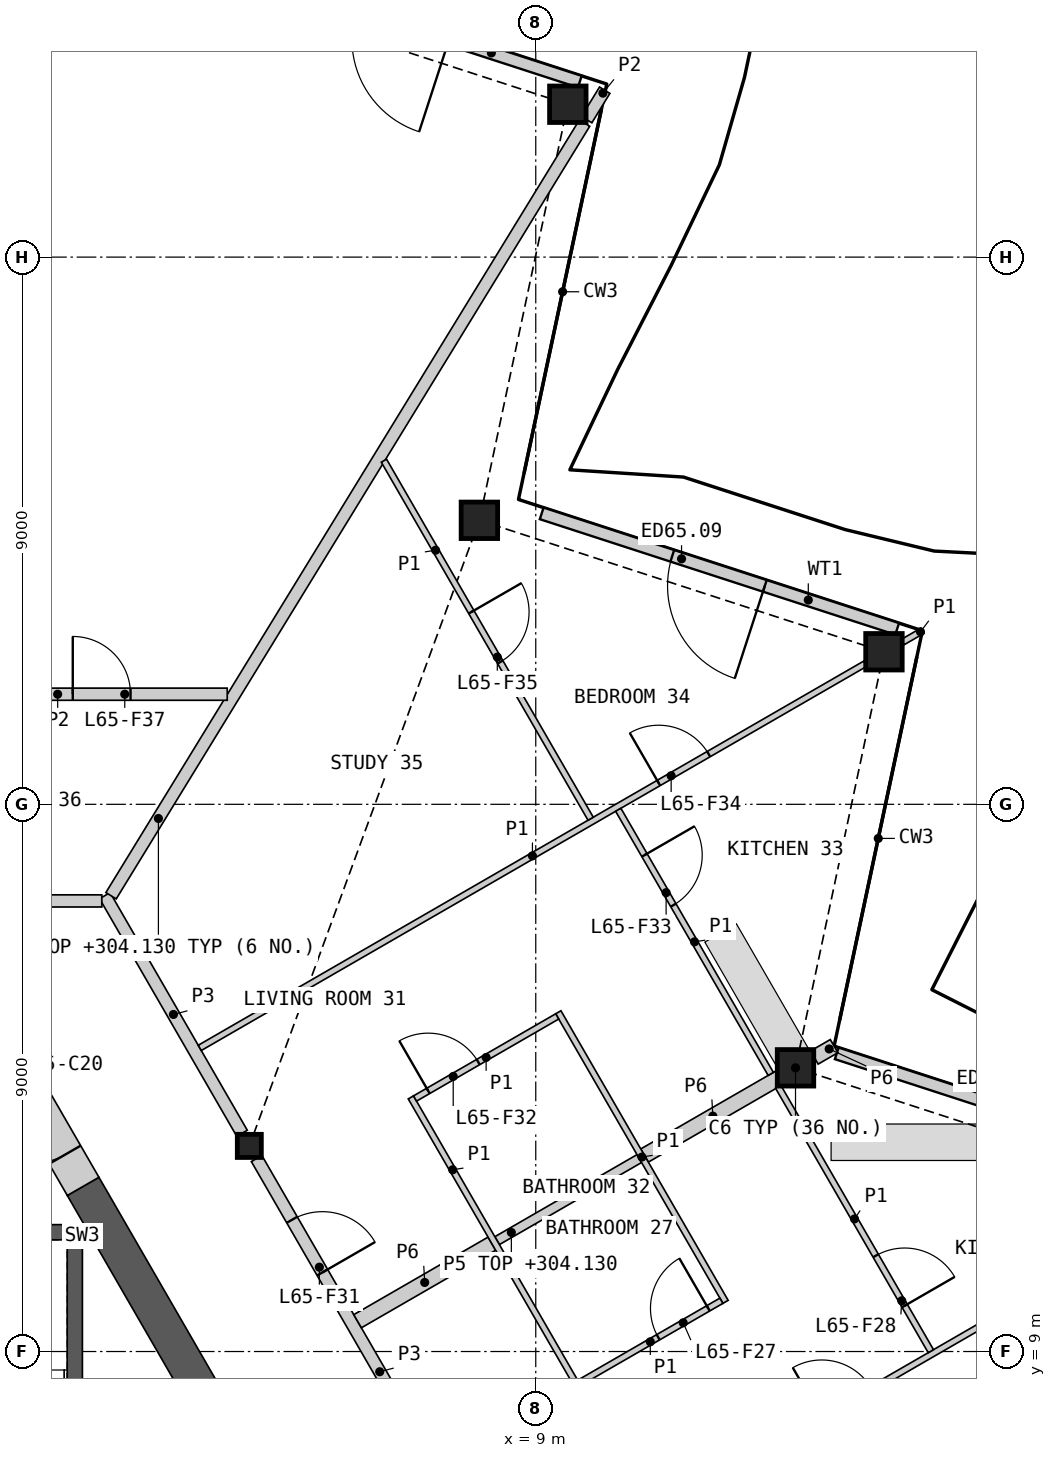
"""IFC4 building model, lengths in metres.
Left out: names, types, materials, properties, quantities, classifications, styles, units other than length and angle.
Written with IfcOpenShell. Run it as: python <this file> out.ifc"""

import sys

from ifc_helpers import new_model, si_unit, direction, frame, frame_2d, origin, origin_2d, place, context, subcontext, project, spatial, polyline, rectangle, hollow_rectangle, i_section, outline, extrude, element, fill, save


model = new_model("IFC4")
c1 = context("Model", 3, precision=1e-05, world=origin(), true_north=direction((0.0, 1.0)))
c2 = subcontext(c1, "Body", "Model", "MODEL_VIEW")
j1 = project(units=[si_unit("LENGTHUNIT", "METRE"), si_unit("PLANEANGLEUNIT", "RADIAN")], contexts=[c1])
p1 = place(None, origin())
s1 = spatial("IfcSite", under=j1, at=p1, CompositionType="ELEMENT")
p2 = place(p1, origin())
s2 = spatial("IfcBuilding", under=s1, at=p2, CompositionType="ELEMENT")
p3 = place(p2, frame((0.0, 0.0, 301.8)))
s3 = spatial("IfcBuildingStorey", under=s2, at=p3, CompositionType="ELEMENT", Elevation=301.8)
for number, where, z_axis, x_axis in (
    (1, (13.272, 13.666, 0.0), (0.0, 0.0, 1.0), (1.0, 0.0, 0.0)),
    (2, (14.727, 20.509, 0.0), (0.0, 0.0, 1.0), (1.0, 0.0, 0.0)),
    (3, (8.073, 22.671, 0.0), (0.0, 0.0, 1.0), (1.0, 0.0, 0.0)),
    (4, (9.527, 29.514, 0.0), (0.0, 0.0, 1.0), (1.0, 0.0, 0.0)),
):
    element("IfcColumn", number, at=place(p3, frame(where, z_axis=z_axis, x_axis=x_axis)), inside=s3, PredefinedType="COLUMN", context=c2, shape_type="SweptSolid", body=[
        extrude(hollow_rectangle(XDim=0.6, YDim=0.6, WallThickness=0.04, at=origin_2d()), origin(), (0.0, 0.0, 1.0), 3.4),
    ])
p4 = place(p3, frame((4.289, 12.382, 0.0), z_axis=(0.0, 0.0, 1.0), x_axis=(1.0, 0.0, 0.0)))
e5 = element("IfcColumn", 5, at=p4, inside=s3, PredefinedType="COLUMN", context=c2, shape_type="SweptSolid", body=[
    extrude(i_section(OverallWidth=0.396, OverallDepth=0.381, WebThickness=0.019, FlangeThickness=0.03, at=origin_2d()), origin(), (0.0, 0.0, 1.0), 3.4),
])
p5 = place(p3, frame((20.178, 11.88, 0.0), z_axis=(0.0, 0.0, 1.0), x_axis=(-0.951053245104, 0.309027061884, 0.0)))
e6 = element("IfcWall", 6, at=p5, inside=s3, PredefinedType="SOLIDWALL", context=c2, shape_type="SweptSolid", body=[
    extrude(rectangle(XDim=6.549, YDim=0.2, at=frame_2d((3.274, 0.0))), origin(), (0.0, 0.0, 1.0), 2.488),
])
p6 = place(p5, frame((2.334, 0.0, 0.0)))
e7 = element("IfcOpeningElement", 7, at=p6, cuts=e6, PredefinedType="OPENING", context=c2, shape_type="SweptSolid", body=[
    extrude(rectangle(XDim=1.6, YDim=2.25, at=frame_2d((0.8, 1.125))), frame((0.0, 0.11, 0.0), z_axis=(0.0, -1.0, 0.0), x_axis=(1.0, 0.0, 0.0)), (0.0, 0.0, 1.0), 0.22),
])
p7 = place(p3, frame((14.944, 20.885, 0.0), z_axis=(0.0, 0.0, 1.0), x_axis=(-0.951062668065, 0.308998060534, 0.0)))
e8 = element("IfcWall", 8, at=p7, inside=s3, PredefinedType="SOLIDWALL", context=c2, shape_type="SweptSolid", body=[
    extrude(rectangle(XDim=6.147, YDim=0.2, at=frame_2d((3.073, 0.0))), origin(), (0.0, 0.0, 1.0), 2.488),
])
p8 = place(p7, frame((2.288, 0.0, 0.0)))
e9 = element("IfcOpeningElement", 9, at=p8, cuts=e8, PredefinedType="OPENING", context=c2, shape_type="SweptSolid", body=[
    extrude(rectangle(XDim=1.6, YDim=2.25, at=frame_2d((0.8, 1.125))), frame((0.0, 0.11, 0.0), z_axis=(0.0, -1.0, 0.0), x_axis=(1.0, 0.0, 0.0)), (0.0, 0.0, 1.0), 0.22),
])
p9 = place(p3, frame((9.724, 29.885, 0.0), z_axis=(0.0, 0.0, 1.0), x_axis=(-0.951066325824, 0.30898680212, 0.0)))
e10 = element("IfcWall", 10, at=p9, inside=s3, PredefinedType="SOLIDWALL", context=c2, shape_type="SweptSolid", body=[
    extrude(rectangle(XDim=6.117, YDim=0.2, at=frame_2d((3.059, 0.0))), origin(), (0.0, 0.0, 1.0), 2.488),
])
p10 = place(p9, frame((2.259, 0.0, 0.0)))
e11 = element("IfcOpeningElement", 11, at=p10, cuts=e10, PredefinedType="OPENING", context=c2, shape_type="SweptSolid", body=[
    extrude(rectangle(XDim=1.6, YDim=2.25, at=frame_2d((0.8, 1.125))), frame((0.0, 0.11, 0.0), z_axis=(0.0, -1.0, 0.0), x_axis=(1.0, 0.0, 0.0)), (0.0, 0.0, 1.0), 0.22),
])
p11 = place(p3, origin())
e12 = element("IfcWall", 12, at=p11, inside=s3, PredefinedType="SHEAR", context=c2, shape_type="SweptSolid", body=[
    extrude(outline(polyline([(1.544, 5.237), (1.544, 11.087), (1.294, 10.837), (1.294, 5.237), (1.544, 5.237)])), origin(), (0.0, 0.0, 1.0), 3.1),
])
p12 = place(p3, origin())
e13 = element("IfcWall", 13, at=p12, inside=s3, PredefinedType="SHEAR", context=c2, shape_type="SweptSolid", body=[
    extrude(outline(polyline([(1.544, 11.087), (-1.544, 11.087), (-1.294, 10.837), (1.294, 10.837), (1.544, 11.087)])), origin(), (0.0, 0.0, 1.0), 3.1),
])
p13 = place(p3, frame((8.841, -0.902, 0.0), z_axis=(0.0, 0.0, 1.0), x_axis=(-0.499995618375, 0.866027933502, 0.0)))
e14 = element("IfcWall", 14, at=p13, inside=s3, PredefinedType="SHEAR", context=c2, shape_type="SweptSolid", body=[
    extrude(rectangle(XDim=14.571, YDim=0.6, at=frame_2d((7.285, 0.0))), origin(), (0.0, 0.0, 1.0), 3.1),
])
p14 = place(p3, frame((1.556, 11.716, 0.0), z_axis=(0.0, 0.0, 1.0), x_axis=(-0.500018667571, 0.866014625789, 0.0)))
e15 = element("IfcWall", 15, at=p14, inside=s3, PredefinedType="SHEAR", context=c2, shape_type="SweptSolid", body=[
    extrude(rectangle(XDim=2.592, YDim=0.6, at=frame_2d((1.296, 0.0))), origin(), (0.0, 0.0, 1.0), 3.1),
])
p15 = place(p14, frame((0.6, 0.0, 0.0)))
e16 = element("IfcOpeningElement", 16, at=p15, cuts=e15, PredefinedType="OPENING", context=c2, shape_type="SweptSolid", body=[
    extrude(rectangle(XDim=1.0, YDim=2.1, at=frame_2d((0.5, 1.05))), frame((0.0, 0.31, 0.0), z_axis=(0.0, -1.0, 0.0), x_axis=(1.0, 0.0, 0.0)), (0.0, 0.0, 1.0), 0.62),
])
p16 = place(p3, frame((4.409, 12.174, 0.0), z_axis=(0.0, 0.0, 1.0), x_axis=(0.499984266882, -0.866034487114, 0.0)))
e17 = element("IfcWall", 17, at=p16, inside=s3, PredefinedType="PARTITIONING", context=c2, shape_type="SweptSolid", body=[
    extrude(rectangle(XDim=8.099, YDim=0.2, at=frame_2d((4.049, 0.0))), origin(), (0.0, 0.0, 1.0), 3.1),
])
p17 = place(p16, frame((5.123, 0.0, 0.0)))
e18 = element("IfcOpeningElement", 18, at=p17, cuts=e17, PredefinedType="OPENING", context=c2, shape_type="SweptSolid", body=[
    extrude(rectangle(XDim=1.0, YDim=2.1, at=frame_2d((0.5, 1.05))), frame((0.0, 0.11, 0.0), z_axis=(0.0, -1.0, 0.0), x_axis=(1.0, 0.0, 0.0)), (0.0, 0.0, 1.0), 0.22),
])
p18 = place(p16, frame((1.164, 0.0, 0.0)))
e19 = element("IfcOpeningElement", 19, at=p18, cuts=e17, PredefinedType="OPENING", context=c2, shape_type="SweptSolid", body=[
    extrude(rectangle(XDim=1.0, YDim=2.1, at=frame_2d((0.5, 1.05))), frame((0.0, 0.11, 0.0), z_axis=(0.0, -1.0, 0.0), x_axis=(1.0, 0.0, 0.0)), (0.0, 0.0, 1.0), 0.22),
])
p19 = place(p3, frame((1.913, 16.498, 0.0), z_axis=(0.0, 0.0, 1.0), x_axis=(0.499950370306, -0.866054055606, 0.0)))
e20 = element("IfcWall", 20, at=p19, inside=s3, PredefinedType="PARTITIONING", context=c2, shape_type="SweptSolid", body=[
    extrude(rectangle(XDim=4.513, YDim=0.2, at=frame_2d((2.256, 0.0))), origin(), (0.0, 0.0, 1.0), 3.1),
])
p20 = place(p3, frame((-1.863, 16.411, 0.0), z_axis=(0.0, 0.0, 1.0), x_axis=(1.0, 0.0, 0.0)))
e21 = element("IfcWall", 21, at=p20, inside=s3, PredefinedType="PARTITIONING", context=c2, shape_type="SweptSolid", body=[
    extrude(rectangle(XDim=3.726, YDim=0.2, at=frame_2d((1.863, 0.0))), origin(), (0.0, 0.0, 1.0), 3.1),
])
p21 = place(p20, frame((1.388, 0.0, 0.0)))
e22 = element("IfcOpeningElement", 22, at=p21, cuts=e21, PredefinedType="OPENING", context=c2, shape_type="SweptSolid", body=[
    extrude(rectangle(XDim=0.95, YDim=2.1, at=frame_2d((0.475, 1.05))), frame((0.0, 0.11, 0.0), z_axis=(0.0, -1.0, 0.0), x_axis=(1.0, 0.0, 0.0)), (0.0, 0.0, 1.0), 0.22),
])
p22 = place(p3, frame((6.07, 9.498, 0.0), z_axis=(0.0, 0.0, 1.0), x_axis=(0.866054858364, 0.499948979701, 0.0)))
e23 = element("IfcWall", 23, at=p22, inside=s3, PredefinedType="PARTITIONING", context=c2, shape_type="SweptSolid", body=[
    extrude(rectangle(XDim=2.55, YDim=0.25, at=frame_2d((1.275, 0.0))), origin(), (0.0, 0.0, 1.0), 2.33),
])
p23 = place(p3, frame((10.789, 12.223, 0.0), z_axis=(0.0, 0.0, 1.0), x_axis=(0.866033547976, 0.499985893582, 0.0)))
e24 = element("IfcWall", 24, at=p23, inside=s3, PredefinedType="PARTITIONING", context=c2, shape_type="SweptSolid", body=[
    extrude(rectangle(XDim=2.594, YDim=0.25, at=frame_2d((1.297, 0.0))), origin(), (0.0, 0.0, 1.0), 2.33),
])
p24 = place(p3, frame((13.582, 13.835, 0.0), z_axis=(0.0, 0.0, 1.0), x_axis=(0.865827443207, 0.500342721131, 0.0)))
e25 = element("IfcWall", 25, at=p24, inside=s3, PredefinedType="PARTITIONING", context=c2, shape_type="SweptSolid", body=[
    extrude(rectangle(XDim=0.375, YDim=0.25, at=frame_2d((0.188, 0.0))), origin(), (0.0, 0.0, 1.0), 2.33),
])
p25 = place(p3, frame((2.015, 16.496, 0.0), z_axis=(0.0, 0.0, 1.0), x_axis=(0.522487920222, 0.852646687217, 0.0)))
e26 = element("IfcWall", 26, at=p25, inside=s3, PredefinedType="PARTITIONING", context=c2, shape_type="SweptSolid", body=[
    extrude(rectangle(XDim=14.904, YDim=0.2, at=frame_2d((7.452, 0.0))), origin(), (0.0, 0.0, 1.0), 2.33),
])
p26 = place(p3, frame((0.208, 19.811, 0.0), z_axis=(0.0, 0.0, 1.0), x_axis=(1.0, 0.0, 0.0)))
e27 = element("IfcWall", 27, at=p26, inside=s3, PredefinedType="PARTITIONING", context=c2, shape_type="SweptSolid", body=[
    extrude(rectangle(XDim=3.718, YDim=0.2, at=frame_2d((1.859, 0.0))), origin(), (0.0, 0.0, 1.0), 2.33),
])
p27 = place(p26, frame((1.178, 0.0, 0.0)))
e28 = element("IfcOpeningElement", 28, at=p27, cuts=e27, PredefinedType="OPENING", context=c2, shape_type="SweptSolid", body=[
    extrude(rectangle(XDim=0.95, YDim=2.1, at=frame_2d((0.475, 1.05))), frame((0.0, 0.11, 0.0), z_axis=(0.0, -1.0, 0.0), x_axis=(1.0, 0.0, 0.0)), (0.0, 0.0, 1.0), 0.22),
])
p28 = place(p3, frame((9.837, 29.261, 0.0), z_axis=(0.0, 0.0, 1.0), x_axis=(0.5225115935, 0.852632180168, 0.0)))
e29 = element("IfcWall", 29, at=p28, inside=s3, PredefinedType="PARTITIONING", context=c2, shape_type="SweptSolid", body=[
    extrude(rectangle(XDim=0.567, YDim=0.2, at=frame_2d((0.284, 0.0))), origin(), (0.0, 0.0, 1.0), 2.33),
])
p29 = place(p3, frame((8.365, 10.823, 0.0), z_axis=(0.0, 0.0, 1.0), x_axis=(0.866019956843, 0.50000943426, 0.0)))
e30 = element("IfcWall", 30, at=p29, inside=s3, PredefinedType="PLUMBINGWALL", context=c2, shape_type="SweptSolid", body=[
    extrude(rectangle(XDim=2.7, YDim=0.15, at=frame_2d((1.35, 0.0))), origin(), (0.0, 0.0, 1.0), 2.33),
])
p30 = place(p3, frame((3.474, 13.994, 0.0), z_axis=(0.0, 0.0, 1.0), x_axis=(0.866032424046, 0.499987840353, 0.0)))
e31 = element("IfcWall", 31, at=p30, inside=s3, PredefinedType="PARTITIONING", context=c2, shape_type="SweptSolid", body=[
    extrude(rectangle(XDim=12.635, YDim=0.1, at=frame_2d((6.317, 0.0))), origin(), (0.0, 0.0, 1.0), 2.33),
])
p31 = place(p30, frame((8.714, 0.0, 0.0)))
e32 = element("IfcOpeningElement", 32, at=p31, cuts=e31, PredefinedType="OPENING", context=c2, shape_type="SweptSolid", body=[
    extrude(rectangle(XDim=0.95, YDim=2.1, at=frame_2d((0.475, 1.05))), frame((0.0, 0.06, 0.0), z_axis=(0.0, -1.0, 0.0), x_axis=(1.0, 0.0, 0.0)), (0.0, 0.0, 1.0), 0.12),
])
p32 = place(p3, frame((8.786, 5.073, 0.0), z_axis=(0.0, 0.0, 1.0), x_axis=(0.86602139559, 0.500006942333, 0.0)))
e33 = element("IfcWall", 33, at=p32, inside=s3, PredefinedType="PARTITIONING", context=c2, shape_type="SweptSolid", body=[
    extrude(rectangle(XDim=12.505, YDim=0.1, at=frame_2d((6.252, 0.0))), origin(), (0.0, 0.0, 1.0), 2.33),
])
p33 = place(p32, frame((5.677, 0.0, 0.0)))
e34 = element("IfcOpeningElement", 34, at=p33, cuts=e33, PredefinedType="OPENING", context=c2, shape_type="SweptSolid", body=[
    extrude(rectangle(XDim=0.95, YDim=2.1, at=frame_2d((0.475, 1.05))), frame((0.0, 0.06, 0.0), z_axis=(0.0, -1.0, 0.0), x_axis=(1.0, 0.0, 0.0)), (0.0, 0.0, 1.0), 0.12),
])
p34 = place(p3, frame((6.503, 23.652, 0.0), z_axis=(0.0, 0.0, 1.0), x_axis=(0.50002393615, -0.866011583801, 0.0)))
e35 = element("IfcWall", 35, at=p34, inside=s3, PredefinedType="PARTITIONING", context=c2, shape_type="SweptSolid", body=[
    extrude(rectangle(XDim=6.8, YDim=0.1, at=frame_2d((3.4, 0.0))), origin(), (0.0, 0.0, 1.0), 2.33),
])
p35 = place(p34, frame((2.874, 0.0, 0.0)))
e36 = element("IfcOpeningElement", 36, at=p35, cuts=e35, PredefinedType="OPENING", context=c2, shape_type="SweptSolid", body=[
    extrude(rectangle(XDim=0.95, YDim=2.1, at=frame_2d((0.475, 1.05))), frame((0.0, 0.06, 0.0), z_axis=(0.0, -1.0, 0.0), x_axis=(1.0, 0.0, 0.0)), (0.0, 0.0, 1.0), 0.12),
])
p36 = place(p3, frame((9.371, 14.58, 0.0), z_axis=(0.0, 0.0, 1.0), x_axis=(0.499996545922, -0.866027397988, 0.0)))
e37 = element("IfcWall", 37, at=p36, inside=s3, PredefinedType="PARTITIONING", context=c2, shape_type="SweptSolid", body=[
    extrude(rectangle(XDim=5.5, YDim=0.1, at=frame_2d((2.75, 0.0))), origin(), (0.0, 0.0, 1.0), 2.33),
])
p37 = place(p3, frame((6.946, 13.18, 0.0), z_axis=(0.0, 0.0, 1.0), x_axis=(0.500015767406, -0.866016300277, 0.0)))
e38 = element("IfcWall", 38, at=p37, inside=s3, PredefinedType="PARTITIONING", context=c2, shape_type="SweptSolid", body=[
    extrude(rectangle(XDim=5.5, YDim=0.1, at=frame_2d((2.75, 0.0))), origin(), (0.0, 0.0, 1.0), 2.33),
])
p38 = place(p3, frame((10.357, 17.91, 0.0), z_axis=(0.0, 0.0, 1.0), x_axis=(0.50000754391, -0.866021048262, 0.0)))
e39 = element("IfcWall", 39, at=p38, inside=s3, PredefinedType="PARTITIONING", context=c2, shape_type="SweptSolid", body=[
    extrude(rectangle(XDim=5.016, YDim=0.1, at=frame_2d((2.508, 0.0))), origin(), (0.0, 0.0, 1.0), 2.33),
])
p39 = place(p38, frame((0.861, 0.0, 0.0)))
e40 = element("IfcOpeningElement", 40, at=p39, cuts=e39, PredefinedType="OPENING", context=c2, shape_type="SweptSolid", body=[
    extrude(rectangle(XDim=0.95, YDim=2.1, at=frame_2d((0.475, 1.05))), frame((0.0, 0.06, 0.0), z_axis=(0.0, -1.0, 0.0), x_axis=(1.0, 0.0, 0.0)), (0.0, 0.0, 1.0), 0.12),
])
p40 = place(p3, frame((12.986, 13.356, 0.0), z_axis=(0.0, 0.0, 1.0), x_axis=(0.500007128048, -0.866021288365, 0.0)))
e41 = element("IfcWall", 41, at=p40, inside=s3, PredefinedType="PARTITIONING", context=c2, shape_type="SweptSolid", body=[
    extrude(rectangle(XDim=5.023, YDim=0.1, at=frame_2d((2.512, 0.0))), origin(), (0.0, 0.0, 1.0), 2.33),
])
p41 = place(p40, frame((3.211, 0.0, 0.0)))
e42 = element("IfcOpeningElement", 42, at=p41, cuts=e41, PredefinedType="OPENING", context=c2, shape_type="SweptSolid", body=[
    extrude(rectangle(XDim=0.95, YDim=2.1, at=frame_2d((0.475, 1.05))), frame((0.0, 0.06, 0.0), z_axis=(0.0, -1.0, 0.0), x_axis=(1.0, 0.0, 0.0)), (0.0, 0.0, 1.0), 0.12),
])
p42 = place(p3, frame((7.015, 13.162, 0.0), z_axis=(0.0, 0.0, 1.0), x_axis=(0.866036505625, 0.499980770555, 0.0)))
e43 = element("IfcWall", 43, at=p42, inside=s3, PredefinedType="PARTITIONING", context=c2, shape_type="SweptSolid", body=[
    extrude(rectangle(XDim=2.7, YDim=0.1, at=frame_2d((1.35, 0.0))), origin(), (0.0, 0.0, 1.0), 2.33),
])
p43 = place(p42, frame((0.25, 0.0, 0.0)))
e44 = element("IfcOpeningElement", 44, at=p43, cuts=e43, PredefinedType="OPENING", context=c2, shape_type="SweptSolid", body=[
    extrude(rectangle(XDim=0.95, YDim=2.1, at=frame_2d((0.475, 1.05))), frame((0.0, 0.06, 0.0), z_axis=(0.0, -1.0, 0.0), x_axis=(1.0, 0.0, 0.0)), (0.0, 0.0, 1.0), 0.12),
])
p44 = place(p3, frame((9.715, 8.485, 0.0), z_axis=(0.0, 0.0, 1.0), x_axis=(0.866036505625, 0.499980770555, 0.0)))
e45 = element("IfcWall", 45, at=p44, inside=s3, PredefinedType="PARTITIONING", context=c2, shape_type="SweptSolid", body=[
    extrude(rectangle(XDim=2.7, YDim=0.1, at=frame_2d((1.35, 0.0))), origin(), (0.0, 0.0, 1.0), 2.33),
])
p45 = place(p44, frame((1.5, 0.0, 0.0)))
e46 = element("IfcOpeningElement", 46, at=p45, cuts=e45, PredefinedType="OPENING", context=c2, shape_type="SweptSolid", body=[
    extrude(rectangle(XDim=0.95, YDim=2.1, at=frame_2d((0.475, 1.05))), frame((0.0, 0.06, 0.0), z_axis=(0.0, -1.0, 0.0), x_axis=(1.0, 0.0, 0.0)), (0.0, 0.0, 1.0), 0.12),
])
p46 = place(p3, frame((15.037, 20.669, 0.0), z_axis=(0.0, 0.0, 1.0), x_axis=(0.865770353626, 0.500441499861, 0.0)))
e47 = element("IfcWall", 47, at=p46, inside=s3, PredefinedType="PARTITIONING", context=c2, shape_type="SweptSolid", body=[
    extrude(rectangle(XDim=0.372, YDim=0.1, at=frame_2d((0.186, 0.0))), origin(), (0.0, 0.0, 1.0), 2.33),
])
p47 = place(p8, origin())
e48 = element("IfcDoor", 48, at=p47, inside=s3, OperationType="DOUBLE_DOOR_SINGLE_SWING", PredefinedType="DOOR", context=c2, shape_type="SweptSolid", body=[
    extrude(rectangle(XDim=1.6, YDim=2.25, at=frame_2d((0.8, 1.125))), frame((0.0, 0.025, 0.0), z_axis=(0.0, -1.0, 0.0), x_axis=(1.0, 0.0, 0.0)), (0.0, 0.0, 1.0), 0.05),
])
fill(e9, e48)
p48 = place(p15, origin())
e49 = element("IfcDoor", 49, at=p48, inside=s3, OperationType="SINGLE_SWING_RIGHT", PredefinedType="DOOR", context=c2, shape_type="SweptSolid", body=[
    extrude(rectangle(XDim=1.0, YDim=2.1, at=frame_2d((0.5, 1.05))), frame((0.0, 0.055, 0.0), z_axis=(0.0, -1.0, 0.0), x_axis=(1.0, 0.0, 0.0)), (0.0, 0.0, 1.0), 0.05),
])
fill(e16, e49)
p49 = place(p45, origin())
e50 = element("IfcDoor", 50, at=p49, inside=s3, OperationType="SINGLE_SWING_RIGHT", PredefinedType="DOOR", context=c2, shape_type="SweptSolid", body=[
    extrude(rectangle(XDim=0.95, YDim=2.1, at=frame_2d((0.475, 1.05))), frame((0.0, 0.025, 0.0), z_axis=(0.0, -1.0, 0.0), x_axis=(1.0, 0.0, 0.0)), (0.0, 0.0, 1.0), 0.05),
])
fill(e46, e50)
p50 = place(p41, origin())
e51 = element("IfcDoor", 51, at=p50, inside=s3, OperationType="SINGLE_SWING_RIGHT", PredefinedType="DOOR", context=c2, shape_type="SweptSolid", body=[
    extrude(rectangle(XDim=0.95, YDim=2.1, at=frame_2d((0.475, 1.05))), frame((0.0, 0.025, 0.0), z_axis=(0.0, -1.0, 0.0), x_axis=(1.0, 0.0, 0.0)), (0.0, 0.0, 1.0), 0.05),
])
fill(e42, e51)
p51 = place(p18, origin())
e52 = element("IfcDoor", 52, at=p51, inside=s3, OperationType="SINGLE_SWING_RIGHT", PredefinedType="DOOR", context=c2, shape_type="SweptSolid", body=[
    extrude(rectangle(XDim=1.0, YDim=2.1, at=frame_2d((0.5, 1.05))), frame((0.0, 0.025, 0.0), z_axis=(0.0, -1.0, 0.0), x_axis=(1.0, 0.0, 0.0)), (0.0, 0.0, 1.0), 0.05),
])
fill(e19, e52)
p52 = place(p43, origin())
e53 = element("IfcDoor", 53, at=p52, inside=s3, OperationType="SINGLE_SWING_LEFT", PredefinedType="DOOR", context=c2, shape_type="SweptSolid", body=[
    extrude(rectangle(XDim=0.95, YDim=2.1, at=frame_2d((0.475, 1.05))), frame((0.0, 0.025, 0.0), z_axis=(0.0, -1.0, 0.0), x_axis=(1.0, 0.0, 0.0)), (0.0, 0.0, 1.0), 0.05),
])
fill(e44, e53)
p53 = place(p39, origin())
e54 = element("IfcDoor", 54, at=p53, inside=s3, OperationType="SINGLE_SWING_LEFT", PredefinedType="DOOR", context=c2, shape_type="SweptSolid", body=[
    extrude(rectangle(XDim=0.95, YDim=2.1, at=frame_2d((0.475, 1.05))), frame((0.0, 0.025, 0.0), z_axis=(0.0, -1.0, 0.0), x_axis=(1.0, 0.0, 0.0)), (0.0, 0.0, 1.0), 0.05),
])
fill(e40, e54)
p54 = place(p31, origin())
e55 = element("IfcDoor", 55, at=p54, inside=s3, OperationType="SINGLE_SWING_LEFT", PredefinedType="DOOR", context=c2, shape_type="SweptSolid", body=[
    extrude(rectangle(XDim=0.95, YDim=2.1, at=frame_2d((0.475, 1.05))), frame((0.0, 0.025, 0.0), z_axis=(0.0, -1.0, 0.0), x_axis=(1.0, 0.0, 0.0)), (0.0, 0.0, 1.0), 0.05),
])
fill(e32, e55)
p55 = place(p35, origin())
e56 = element("IfcDoor", 56, at=p55, inside=s3, OperationType="SINGLE_SWING_LEFT", PredefinedType="DOOR", context=c2, shape_type="SweptSolid", body=[
    extrude(rectangle(XDim=0.95, YDim=2.1, at=frame_2d((0.475, 1.05))), frame((0.0, 0.025, 0.0), z_axis=(0.0, -1.0, 0.0), x_axis=(1.0, 0.0, 0.0)), (0.0, 0.0, 1.0), 0.05),
])
fill(e36, e56)
p56 = place(p27, origin())
e57 = element("IfcDoor", 57, at=p56, inside=s3, OperationType="SINGLE_SWING_LEFT", PredefinedType="DOOR", context=c2, shape_type="SweptSolid", body=[
    extrude(rectangle(XDim=0.95, YDim=2.1, at=frame_2d((0.475, 1.05))), frame((0.0, 0.025, 0.0), z_axis=(0.0, -1.0, 0.0), x_axis=(1.0, 0.0, 0.0)), (0.0, 0.0, 1.0), 0.05),
])
fill(e28, e57)
save(model, sys.argv[1])
